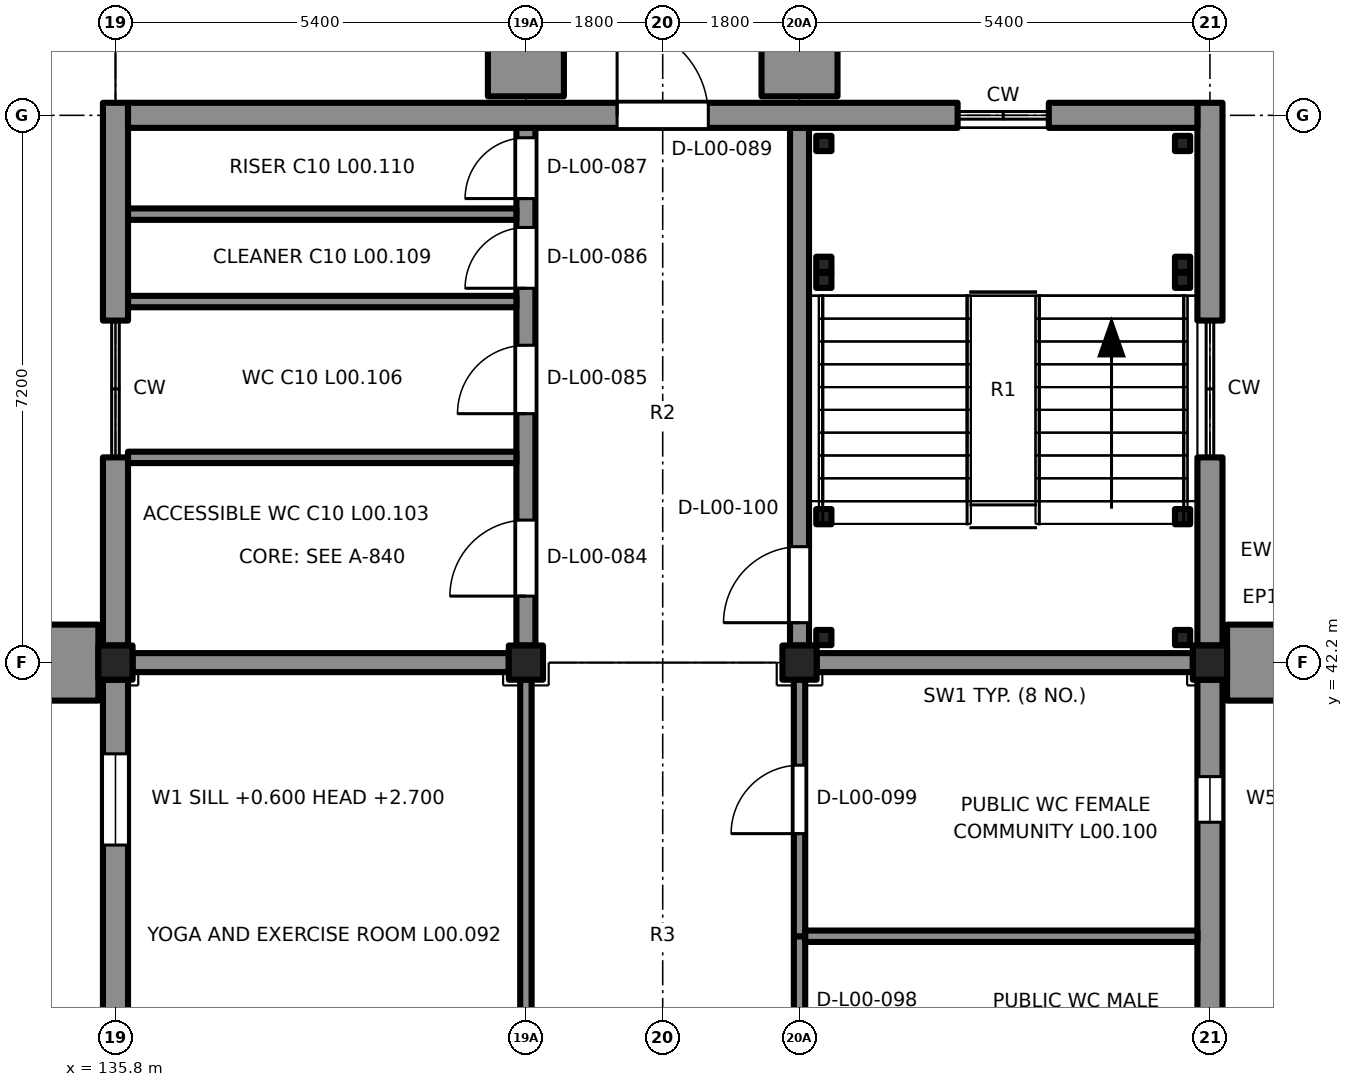
"""IFC4 building model, lengths in metres.
Left out: names, types, materials, properties, quantities, classifications, styles, units other than length and angle.
Written with IfcOpenShell. Run it as: python <this file> out.ifc"""

import sys

from ifc_helpers import new_model, si_unit, direction, frame, frame_2d, origin, origin_2d, place, context, subcontext, project, spatial, rectangle, extrude, element, fill, save


model = new_model("IFC4")
c1 = context("Model", 3, precision=1e-05, world=origin(), true_north=direction((0.0, 1.0)))
c2 = subcontext(c1, "Body", "Model", "MODEL_VIEW")
j1 = project(units=[si_unit("LENGTHUNIT", "METRE"), si_unit("PLANEANGLEUNIT", "RADIAN")], contexts=[c1])
p1 = place(None, origin())
s1 = spatial("IfcSite", under=j1, at=p1, CompositionType="ELEMENT")
p2 = place(p1, origin())
s2 = spatial("IfcBuilding", under=s1, at=p2, CompositionType="ELEMENT")
p3 = place(p2, origin())
s3 = spatial("IfcBuildingStorey", under=s2, at=p3, CompositionType="ELEMENT", Elevation=0.0)
for number, where, z_axis, x_axis in (
    (1, (135.8, 42.2, -0.2), (0.0, 0.0, 1.0), (1.0, 0.0, 0.0)),
    (2, (141.2, 42.2, -0.2), (0.0, 0.0, 1.0), (1.0, 0.0, 0.0)),
    (3, (144.8, 42.2, -0.2), (0.0, 0.0, 1.0), (1.0, 0.0, 0.0)),
    (4, (150.2, 42.2, -0.2), (0.0, 0.0, 1.0), (1.0, 0.0, 0.0)),
):
    element("IfcColumn", number, at=place(p3, frame(where, z_axis=z_axis, x_axis=x_axis)), inside=s3, PredefinedType="COLUMN", context=c2, shape_type="SweptSolid", body=[
        extrude(rectangle(XDim=0.45, YDim=0.45, at=origin_2d()), origin(), (0.0, 0.0, 1.0), 5.55),
    ])
p4 = place(p3, frame((144.8, 42.425, 0.0), z_axis=(0.0, 0.0, 1.0), x_axis=(0.0, 1.0, 0.0)))
e5 = element("IfcWall", 5, at=p4, inside=s3, PredefinedType="SHEAR", context=c2, shape_type="SweptSolid", body=[
    extrude(rectangle(XDim=6.81, YDim=0.25, at=frame_2d((3.405, 0.0))), origin(), (0.0, 0.0, 1.0), 6.05),
])
p5 = place(p4, frame((0.3, 0.0, 0.0)))
e6 = element("IfcOpeningElement", 6, at=p5, cuts=e5, PredefinedType="OPENING", context=c2, shape_type="SweptSolid", body=[
    extrude(rectangle(XDim=1.0, YDim=2.1, at=frame_2d((0.5, 1.05))), frame((0.0, 0.135, 0.0), z_axis=(0.0, -1.0, 0.0), x_axis=(1.0, 0.0, 0.0)), (0.0, 0.0, 1.0), 0.27),
])
p6 = place(p3, frame((145.025, 42.2, 0.0), z_axis=(0.0, 0.0, 1.0), x_axis=(1.0, 0.0, 0.0)))
e7 = element("IfcWall", 7, at=p6, inside=s3, PredefinedType="SHEAR", context=c2, shape_type="SweptSolid", body=[
    extrude(rectangle(XDim=4.95, YDim=0.25, at=frame_2d((2.475, 0.0))), origin(), (0.0, 0.0, 1.0), 6.05),
])
p7 = place(p3, frame((141.2, 42.425, 0.0), z_axis=(0.0, 0.0, 1.0), x_axis=(0.0, 1.0, 0.0)))
e8 = element("IfcWall", 8, at=p7, inside=s3, PredefinedType="SHEAR", context=c2, shape_type="SweptSolid", body=[
    extrude(rectangle(XDim=6.81, YDim=0.25, at=frame_2d((3.405, 0.0))), origin(), (0.0, 0.0, 1.0), 6.05),
])
p8 = place(p7, frame((0.65, 0.0, 0.0)))
e9 = element("IfcOpeningElement", 9, at=p8, cuts=e8, PredefinedType="OPENING", context=c2, shape_type="SweptSolid", body=[
    extrude(rectangle(XDim=1.0, YDim=2.1, at=frame_2d((0.5, 1.05))), frame((0.0, 0.135, 0.0), z_axis=(0.0, -1.0, 0.0), x_axis=(1.0, 0.0, 0.0)), (0.0, 0.0, 1.0), 0.27),
])
p9 = place(p7, frame((3.05, 0.0, 0.0)))
e10 = element("IfcOpeningElement", 10, at=p9, cuts=e8, PredefinedType="OPENING", context=c2, shape_type="SweptSolid", body=[
    extrude(rectangle(XDim=0.9, YDim=2.1, at=frame_2d((0.45, 1.05))), frame((0.0, 0.135, 0.0), z_axis=(0.0, -1.0, 0.0), x_axis=(1.0, 0.0, 0.0)), (0.0, 0.0, 1.0), 0.27),
])
p10 = place(p7, frame((4.7, 0.0, 0.0)))
e11 = element("IfcOpeningElement", 11, at=p10, cuts=e8, PredefinedType="OPENING", context=c2, shape_type="SweptSolid", body=[
    extrude(rectangle(XDim=0.8, YDim=2.1, at=frame_2d((0.4, 1.05))), frame((0.0, 0.135, 0.0), z_axis=(0.0, -1.0, 0.0), x_axis=(1.0, 0.0, 0.0)), (0.0, 0.0, 1.0), 0.27),
])
p11 = place(p7, frame((5.88, 0.0, 0.0)))
e12 = element("IfcOpeningElement", 12, at=p11, cuts=e8, PredefinedType="OPENING", context=c2, shape_type="SweptSolid", body=[
    extrude(rectangle(XDim=0.8, YDim=2.1, at=frame_2d((0.4, 1.05))), frame((0.0, 0.135, 0.0), z_axis=(0.0, -1.0, 0.0), x_axis=(1.0, 0.0, 0.0)), (0.0, 0.0, 1.0), 0.27),
])
p12 = place(p3, frame((136.025, 42.2, 0.0), z_axis=(0.0, 0.0, 1.0), x_axis=(1.0, 0.0, 0.0)))
e13 = element("IfcWall", 13, at=p12, inside=s3, PredefinedType="SHEAR", context=c2, shape_type="SweptSolid", body=[
    extrude(rectangle(XDim=4.95, YDim=0.25, at=frame_2d((2.475, 0.0))), origin(), (0.0, 0.0, 1.0), 6.05),
])
for number, where, z_axis, x_axis in (
    (14, (135.965, 44.9, 0.0), (0.0, 0.0, 1.0), (1.0, 0.0, 0.0)),
    (15, (135.965, 46.95, 0.0), (0.0, 0.0, 1.0), (1.0, 0.0, 0.0)),
    (16, (135.965, 48.1, 0.0), (0.0, 0.0, 1.0), (1.0, 0.0, 0.0)),
):
    element("IfcWall", number, at=place(p3, frame(where, z_axis=z_axis, x_axis=x_axis)), inside=s3, PredefinedType="PARTITIONING", context=c2, shape_type="SweptSolid", body=[
        extrude(rectangle(XDim=5.11, YDim=0.15, at=frame_2d((2.555, 0.0))), origin(), (0.0, 0.0, 1.0), 6.05),
    ])
p13 = place(p3, frame((145.12, 47.23, 0.0), z_axis=(0.0, 0.0, 1.0), x_axis=(1.0, 0.0, 0.0)))
e17 = element("IfcColumn", 17, at=p13, inside=s3, PredefinedType="COLUMN", context=c2, shape_type="SweptSolid", body=[
    extrude(rectangle(XDim=0.2, YDim=0.2, at=origin_2d()), origin(), (0.0, 0.0, 1.0), 4.45),
])
p14 = place(p3, frame((145.12, 49.03, 0.0), z_axis=(0.0, 0.0, 1.0), x_axis=(1.0, 0.0, 0.0)))
e18 = element("IfcColumn", 18, at=p14, inside=s3, PredefinedType="COLUMN", context=c2, shape_type="SweptSolid", body=[
    extrude(rectangle(XDim=0.2, YDim=0.2, at=origin_2d()), origin(), (0.0, 0.0, 1.0), 6.3),
])
p15 = place(p3, frame((149.84, 47.23, 0.0), z_axis=(0.0, 0.0, 1.0), x_axis=(1.0, 0.0, 0.0)))
e19 = element("IfcColumn", 19, at=p15, inside=s3, PredefinedType="COLUMN", context=c2, shape_type="SweptSolid", body=[
    extrude(rectangle(XDim=0.2, YDim=0.2, at=origin_2d()), origin(), (0.0, 0.0, 1.0), 4.45),
])
p16 = place(p3, frame((149.84, 49.03, 0.0), z_axis=(0.0, 0.0, 1.0), x_axis=(1.0, 0.0, 0.0)))
e20 = element("IfcColumn", 20, at=p16, inside=s3, PredefinedType="COLUMN", context=c2, shape_type="SweptSolid", body=[
    extrude(rectangle(XDim=0.2, YDim=0.2, at=origin_2d()), origin(), (0.0, 0.0, 1.0), 6.3),
])
for number, where, z_axis, x_axis in (
    (21, (145.12, 42.53, 0.0), (0.0, 0.0, 1.0), (1.0, 0.0, 0.0)),
    (22, (145.12, 44.12, 0.0), (0.0, 0.0, 1.0), (1.0, 0.0, 0.0)),
    (23, (149.84, 42.53, 0.0), (0.0, 0.0, 1.0), (1.0, 0.0, 0.0)),
    (24, (149.84, 44.12, 0.0), (0.0, 0.0, 1.0), (1.0, 0.0, 0.0)),
):
    element("IfcColumn", number, at=place(p3, frame(where, z_axis=z_axis, x_axis=x_axis)), inside=s3, PredefinedType="COLUMN", context=c2, shape_type="SweptSolid", body=[
        extrude(rectangle(XDim=0.2, YDim=0.2, at=origin_2d()), origin(), (0.0, 0.0, 1.0), 2.95),
    ])
for number, where, z_axis, x_axis in (
    (25, (145.12, 47.44, 0.0), (0.0, 0.0, 1.0), (1.0, 0.0, 0.0)),
    (26, (149.84, 47.44, 0.0), (0.0, 0.0, 1.0), (1.0, 0.0, 0.0)),
):
    element("IfcColumn", number, at=place(p3, frame(where, z_axis=z_axis, x_axis=x_axis)), inside=s3, PredefinedType="COLUMN", context=c2, shape_type="SweptSolid", body=[
        extrude(rectangle(XDim=0.2, YDim=0.2, at=origin_2d()), origin(), (0.0, 0.0, 1.0), 6.3),
    ])
p17 = place(p3, frame((135.8, 35.225, 0.0), z_axis=(0.0, 0.0, 1.0), x_axis=(0.0, 1.0, 0.0)))
e27 = element("IfcWall", 27, at=p17, inside=s3, PredefinedType="SOLIDWALL", context=c2, shape_type="SweptSolid", body=[
    extrude(rectangle(XDim=6.75, YDim=0.33, at=frame_2d((3.375, 0.0))), origin(), (0.0, 0.0, 1.0), 5.35),
])
p18 = place(p17, frame((0.975, 0.0, 0.6)))
e28 = element("IfcOpeningElement", 28, at=p18, cuts=e27, PredefinedType="OPENING", context=c2, shape_type="SweptSolid", body=[
    extrude(rectangle(XDim=1.2, YDim=2.1, at=frame_2d((0.6, 1.05))), frame((0.0, 0.175, 0.0), z_axis=(0.0, -1.0, 0.0), x_axis=(1.0, 0.0, 0.0)), (0.0, 0.0, 1.0), 0.35),
])
p19 = place(p17, frame((4.575, 0.0, 0.6)))
e29 = element("IfcOpeningElement", 29, at=p19, cuts=e27, PredefinedType="OPENING", context=c2, shape_type="SweptSolid", body=[
    extrude(rectangle(XDim=1.2, YDim=2.1, at=frame_2d((0.6, 1.05))), frame((0.0, 0.175, 0.0), z_axis=(0.0, -1.0, 0.0), x_axis=(1.0, 0.0, 0.0)), (0.0, 0.0, 1.0), 0.35),
])
p20 = place(p3, frame((135.8, 42.425, 0.0), z_axis=(0.0, 0.0, 1.0), x_axis=(0.0, 1.0, 0.0)))
e30 = element("IfcWall", 30, at=p20, inside=s3, PredefinedType="SOLIDWALL", context=c2, shape_type="SweptSolid", body=[
    extrude(rectangle(XDim=2.475, YDim=0.33, at=frame_2d((1.237, 0.0))), origin(), (0.0, 0.0, 1.0), 5.35),
])
p21 = place(p3, frame((135.8, 46.7, 0.0), z_axis=(0.0, 0.0, 1.0), x_axis=(0.0, 1.0, 0.0)))
e31 = element("IfcWall", 31, at=p21, inside=s3, PredefinedType="SOLIDWALL", context=c2, shape_type="SweptSolid", body=[
    extrude(rectangle(XDim=2.865, YDim=0.33, at=frame_2d((1.433, 0.0))), origin(), (0.0, 0.0, 1.0), 5.35),
])
p22 = place(p3, frame((135.2, 41.7, 0.0), z_axis=(0.0, 0.0, 1.0), x_axis=(0.0, 1.0, 0.0)))
e32 = element("IfcWall", 32, at=p22, inside=s3, PredefinedType="SOLIDWALL", context=c2, shape_type="SweptSolid", body=[
    extrude(rectangle(XDim=1.0, YDim=0.75, at=frame_2d((0.5, 0.0))), origin(), (0.0, 0.0, 1.0), 6.3),
])
p23 = place(p3, frame((150.2, 41.975, 0.0), z_axis=(0.0, 0.0, 1.0), x_axis=(0.0, -1.0, 0.0)))
e33 = element("IfcWall", 33, at=p23, inside=s3, PredefinedType="SOLIDWALL", context=c2, shape_type="SweptSolid", body=[
    extrude(rectangle(XDim=6.75, YDim=0.33, at=frame_2d((3.375, 0.0))), origin(), (0.0, 0.0, 1.0), 5.35),
])
p24 = place(p23, frame((4.875, 0.0, 1.5)))
e34 = element("IfcOpeningElement", 34, at=p24, cuts=e33, PredefinedType="OPENING", context=c2, shape_type="SweptSolid", body=[
    extrude(rectangle(XDim=0.6, YDim=0.6, at=frame_2d((0.3, 0.3))), frame((0.0, 0.175, 0.0), z_axis=(0.0, -1.0, 0.0), x_axis=(1.0, 0.0, 0.0)), (0.0, 0.0, 1.0), 0.35),
])
p25 = place(p23, frame((1.275, 0.0, 1.5)))
e35 = element("IfcOpeningElement", 35, at=p25, cuts=e33, PredefinedType="OPENING", context=c2, shape_type="SweptSolid", body=[
    extrude(rectangle(XDim=0.6, YDim=0.6, at=frame_2d((0.3, 0.3))), frame((0.0, 0.175, 0.0), z_axis=(0.0, -1.0, 0.0), x_axis=(1.0, 0.0, 0.0)), (0.0, 0.0, 1.0), 0.35),
])
p26 = place(p3, frame((150.2, 44.9, 0.0), z_axis=(0.0, 0.0, 1.0), x_axis=(0.0, -1.0, 0.0)))
e36 = element("IfcWall", 36, at=p26, inside=s3, PredefinedType="SOLIDWALL", context=c2, shape_type="SweptSolid", body=[
    extrude(rectangle(XDim=2.475, YDim=0.33, at=frame_2d((1.237, 0.0))), origin(), (0.0, 0.0, 1.0), 5.35),
])
p27 = place(p3, frame((150.2, 49.565, 0.0), z_axis=(0.0, 0.0, 1.0), x_axis=(0.0, -1.0, 0.0)))
e37 = element("IfcWall", 37, at=p27, inside=s3, PredefinedType="SOLIDWALL", context=c2, shape_type="SweptSolid", body=[
    extrude(rectangle(XDim=2.865, YDim=0.33, at=frame_2d((1.433, 0.0))), origin(), (0.0, 0.0, 1.0), 5.35),
])
p28 = place(p3, frame((150.8, 42.7, 0.0), z_axis=(0.0, 0.0, 1.0), x_axis=(0.0, -1.0, 0.0)))
e38 = element("IfcWall", 38, at=p28, inside=s3, PredefinedType="SOLIDWALL", context=c2, shape_type="SweptSolid", body=[
    extrude(rectangle(XDim=1.0, YDim=0.75, at=frame_2d((0.5, 0.0))), origin(), (0.0, 0.0, 1.0), 6.3),
])
p29 = place(p3, frame((135.965, 49.4, 0.0), z_axis=(0.0, 0.0, 1.0), x_axis=(1.0, 0.0, 0.0)))
e39 = element("IfcWall", 39, at=p29, inside=s3, PredefinedType="SOLIDWALL", context=c2, shape_type="SweptSolid", body=[
    extrude(rectangle(XDim=10.915, YDim=0.33, at=frame_2d((5.458, 0.0))), origin(), (0.0, 0.0, 1.0), 5.5),
])
p30 = place(p29, frame((6.435, 0.0, 0.0)))
e40 = element("IfcOpeningElement", 40, at=p30, cuts=e39, PredefinedType="OPENING", context=c2, shape_type="SweptSolid", body=[
    extrude(rectangle(XDim=1.2, YDim=2.1, at=frame_2d((0.6, 1.05))), frame((0.0, 0.175, 0.0), z_axis=(0.0, -1.0, 0.0), x_axis=(1.0, 0.0, 0.0)), (0.0, 0.0, 1.0), 0.35),
])
p31 = place(p3, frame((148.08, 49.4, 0.0), z_axis=(0.0, 0.0, 1.0), x_axis=(1.0, 0.0, 0.0)))
e41 = element("IfcWall", 41, at=p31, inside=s3, PredefinedType="SOLIDWALL", context=c2, shape_type="SweptSolid", body=[
    extrude(rectangle(XDim=1.955, YDim=0.33, at=frame_2d((0.978, 0.0))), origin(), (0.0, 0.0, 1.0), 5.5),
])
for number, where, z_axis, x_axis in (
    (42, (140.7, 50.025, 0.0), (0.0, 0.0, 1.0), (1.0, 0.0, 0.0)),
    (43, (144.3, 50.025, 0.0), (0.0, 0.0, 1.0), (1.0, 0.0, 0.0)),
):
    element("IfcWall", number, at=place(p3, frame(where, z_axis=z_axis, x_axis=x_axis)), inside=s3, PredefinedType="SOLIDWALL", context=c2, shape_type="SweptSolid", body=[
        extrude(rectangle(XDim=1.0, YDim=0.75, at=frame_2d((0.5, 0.0))), origin(), (0.0, 0.0, 1.0), 6.3),
    ])
p32 = place(p3, frame((141.2, 35.225, 0.0), z_axis=(0.0, 0.0, 1.0), x_axis=(0.0, 1.0, 0.0)))
e44 = element("IfcWall", 44, at=p32, inside=s3, PredefinedType="PARTITIONING", context=c2, shape_type="SweptSolid", body=[
    extrude(rectangle(XDim=6.75, YDim=0.15, at=frame_2d((3.375, 0.0))), origin(), (0.0, 0.0, 1.0), 5.35),
])
p33 = place(p32, frame((1.075, 0.0, 0.0)))
e45 = element("IfcOpeningElement", 45, at=p33, cuts=e44, PredefinedType="OPENING", context=c2, shape_type="SweptSolid", body=[
    extrude(rectangle(XDim=1.0, YDim=2.1, at=frame_2d((0.5, 1.05))), frame((0.0, 0.085, 0.0), z_axis=(0.0, -1.0, 0.0), x_axis=(1.0, 0.0, 0.0)), (0.0, 0.0, 1.0), 0.17),
])
p34 = place(p3, frame((144.8, 35.225, 0.0), z_axis=(0.0, 0.0, 1.0), x_axis=(0.0, 1.0, 0.0)))
e46 = element("IfcWall", 46, at=p34, inside=s3, PredefinedType="PARTITIONING", context=c2, shape_type="SweptSolid", body=[
    extrude(rectangle(XDim=3.375, YDim=0.15, at=frame_2d((1.688, 0.0))), origin(), (0.0, 0.0, 1.0), 5.35),
])
p35 = place(p34, frame((1.125, 0.0, 0.0)))
e47 = element("IfcOpeningElement", 47, at=p35, cuts=e46, PredefinedType="OPENING", context=c2, shape_type="SweptSolid", body=[
    extrude(rectangle(XDim=0.9, YDim=2.1, at=frame_2d((0.45, 1.05))), frame((0.0, 0.085, 0.0), z_axis=(0.0, -1.0, 0.0), x_axis=(1.0, 0.0, 0.0)), (0.0, 0.0, 1.0), 0.17),
])
p36 = place(p3, frame((144.8, 38.6, 0.0), z_axis=(0.0, 0.0, 1.0), x_axis=(0.0, 1.0, 0.0)))
e48 = element("IfcWall", 48, at=p36, inside=s3, PredefinedType="PARTITIONING", context=c2, shape_type="SweptSolid", body=[
    extrude(rectangle(XDim=3.375, YDim=0.15, at=frame_2d((1.688, 0.0))), origin(), (0.0, 0.0, 1.0), 5.35),
])
p37 = place(p36, frame((1.35, 0.0, 0.0)))
e49 = element("IfcOpeningElement", 49, at=p37, cuts=e48, PredefinedType="OPENING", context=c2, shape_type="SweptSolid", body=[
    extrude(rectangle(XDim=0.9, YDim=2.1, at=frame_2d((0.45, 1.05))), frame((0.0, 0.085, 0.0), z_axis=(0.0, -1.0, 0.0), x_axis=(1.0, 0.0, 0.0)), (0.0, 0.0, 1.0), 0.17),
])
p38 = place(p3, frame((150.035, 38.6, 0.0), z_axis=(0.0, 0.0, 1.0), x_axis=(-1.0, 0.0, 0.0)))
e50 = element("IfcWall", 50, at=p38, inside=s3, PredefinedType="PARTITIONING", context=c2, shape_type="SweptSolid", body=[
    extrude(rectangle(XDim=5.16, YDim=0.15, at=frame_2d((2.58, 0.0))), origin(), (0.0, 0.0, 1.0), 6.05),
])
p39 = place(p5, origin())
e51 = element("IfcDoor", 51, at=p39, inside=s3, OperationType="SINGLE_SWING_RIGHT", PredefinedType="DOOR", context=c2, shape_type="SweptSolid", body=[
    extrude(rectangle(XDim=1.0, YDim=2.1, at=frame_2d((0.5, 1.05))), frame((0.0, 0.025, 0.0), z_axis=(0.0, -1.0, 0.0), x_axis=(1.0, 0.0, 0.0)), (0.0, 0.0, 1.0), 0.05),
])
fill(e6, e51)
p40 = place(p8, origin())
e52 = element("IfcDoor", 52, at=p40, inside=s3, OperationType="SINGLE_SWING_LEFT", PredefinedType="DOOR", context=c2, shape_type="SweptSolid", body=[
    extrude(rectangle(XDim=1.0, YDim=2.1, at=frame_2d((0.5, 1.05))), frame((0.0, 0.025, 0.0), z_axis=(0.0, -1.0, 0.0), x_axis=(1.0, 0.0, 0.0)), (0.0, 0.0, 1.0), 0.05),
])
fill(e9, e52)
p41 = place(p9, origin())
e53 = element("IfcDoor", 53, at=p41, inside=s3, OperationType="SINGLE_SWING_LEFT", PredefinedType="DOOR", context=c2, shape_type="SweptSolid", body=[
    extrude(rectangle(XDim=0.9, YDim=2.1, at=frame_2d((0.45, 1.05))), frame((0.0, 0.025, 0.0), z_axis=(0.0, -1.0, 0.0), x_axis=(1.0, 0.0, 0.0)), (0.0, 0.0, 1.0), 0.05),
])
fill(e10, e53)
p42 = place(p10, origin())
e54 = element("IfcDoor", 54, at=p42, inside=s3, OperationType="SINGLE_SWING_LEFT", PredefinedType="DOOR", context=c2, shape_type="SweptSolid", body=[
    extrude(rectangle(XDim=0.8, YDim=2.1, at=frame_2d((0.4, 1.05))), frame((0.0, 0.025, 0.0), z_axis=(0.0, -1.0, 0.0), x_axis=(1.0, 0.0, 0.0)), (0.0, 0.0, 1.0), 0.05),
])
fill(e11, e54)
p43 = place(p11, origin())
e55 = element("IfcDoor", 55, at=p43, inside=s3, OperationType="SINGLE_SWING_LEFT", PredefinedType="DOOR", context=c2, shape_type="SweptSolid", body=[
    extrude(rectangle(XDim=0.8, YDim=2.1, at=frame_2d((0.4, 1.05))), frame((0.0, 0.025, 0.0), z_axis=(0.0, -1.0, 0.0), x_axis=(1.0, 0.0, 0.0)), (0.0, 0.0, 1.0), 0.05),
])
fill(e12, e55)
p44 = place(p19, origin())
e56 = element("IfcWindow", 56, at=p44, inside=s3, PartitioningType="SINGLE_PANEL", PredefinedType="WINDOW", context=c2, shape_type="SweptSolid", body=[
    extrude(rectangle(XDim=1.2, YDim=2.1, at=frame_2d((0.6, 1.05))), frame((0.0, -0.03, 0.0), z_axis=(0.0, -1.0, 0.0), x_axis=(1.0, 0.0, 0.0)), (0.0, 0.0, 1.0), 0.06),
])
fill(e29, e56)
p45 = place(p25, origin())
e57 = element("IfcWindow", 57, at=p45, inside=s3, PartitioningType="SINGLE_PANEL", PredefinedType="WINDOW", context=c2, shape_type="SweptSolid", body=[
    extrude(rectangle(XDim=0.6, YDim=0.6, at=frame_2d((0.3, 0.3))), frame((0.0, -0.03, 0.0), z_axis=(0.0, -1.0, 0.0), x_axis=(1.0, 0.0, 0.0)), (0.0, 0.0, 1.0), 0.06),
])
fill(e35, e57)
p46 = place(p30, origin())
e58 = element("IfcDoor", 58, at=p46, inside=s3, OperationType="SINGLE_SWING_LEFT", PredefinedType="DOOR", context=c2, shape_type="SweptSolid", body=[
    extrude(rectangle(XDim=1.2, YDim=2.1, at=frame_2d((0.6, 1.05))), frame((0.0, 0.025, 0.0), z_axis=(0.0, -1.0, 0.0), x_axis=(1.0, 0.0, 0.0)), (0.0, 0.0, 1.0), 0.05),
])
fill(e40, e58)
p47 = place(p37, origin())
e59 = element("IfcDoor", 59, at=p47, inside=s3, OperationType="SINGLE_SWING_RIGHT", PredefinedType="DOOR", context=c2, shape_type="SweptSolid", body=[
    extrude(rectangle(XDim=0.9, YDim=2.1, at=frame_2d((0.45, 1.05))), frame((0.0, 0.025, 0.0), z_axis=(0.0, -1.0, 0.0), x_axis=(1.0, 0.0, 0.0)), (0.0, 0.0, 1.0), 0.05),
])
fill(e49, e59)
save(model, sys.argv[1])
